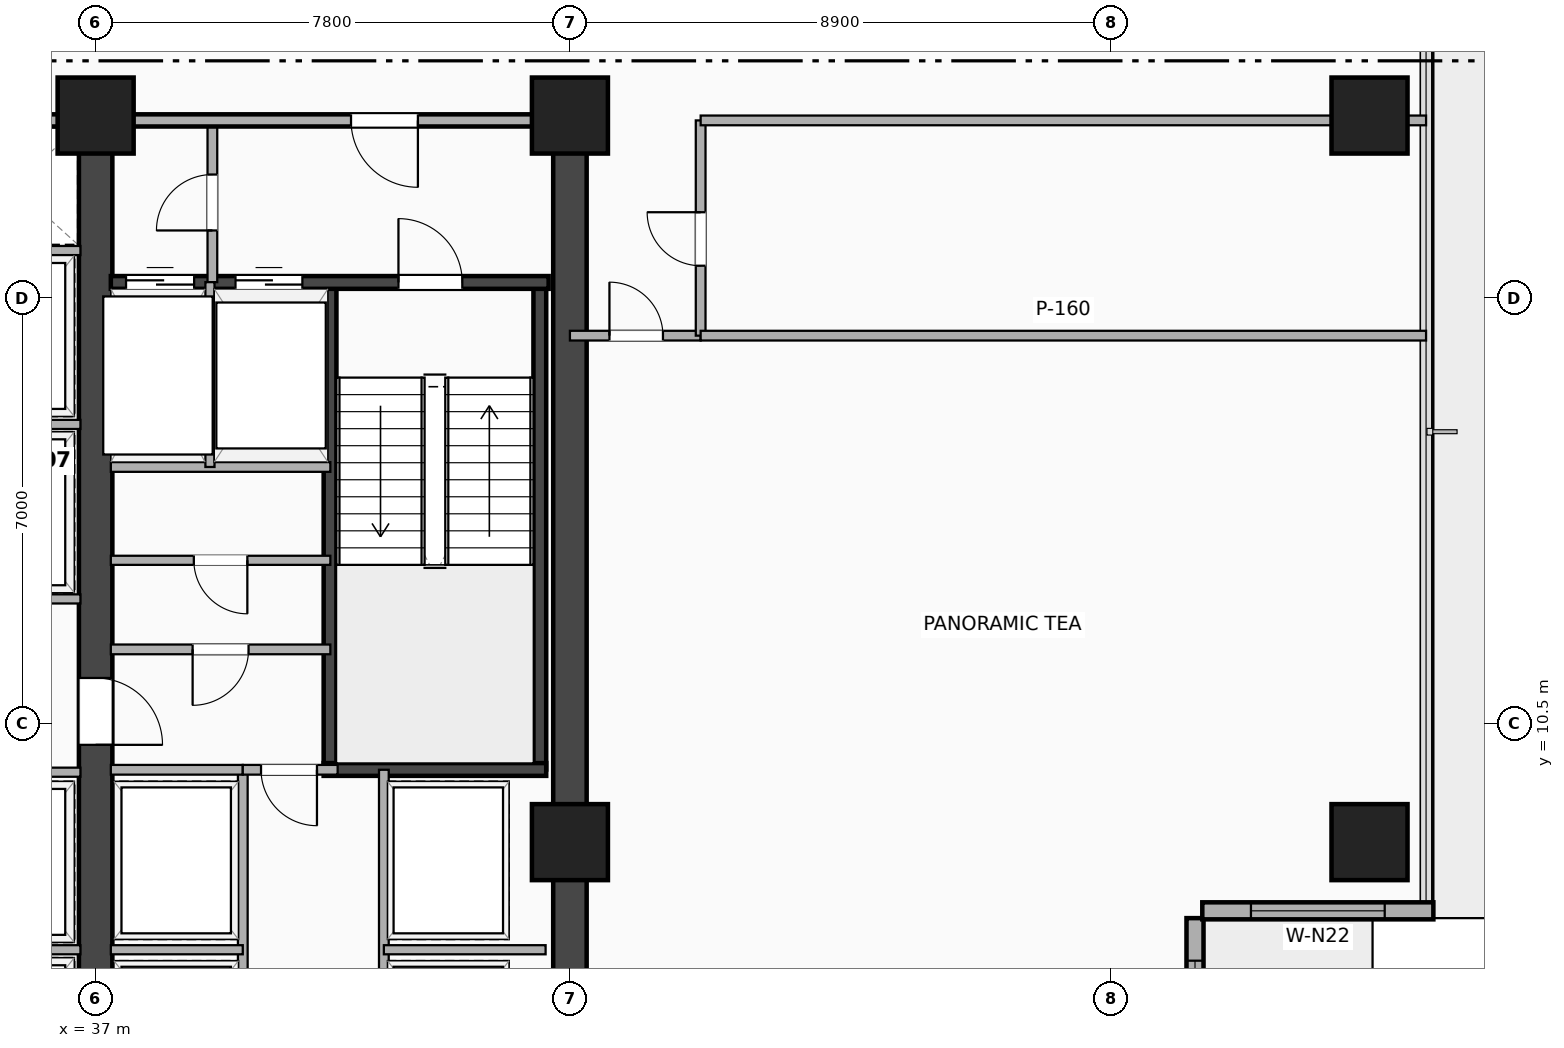
"""IFC4 building model, lengths in metres.
Left out: names, types, materials, properties, quantities, classifications, styles, units other than length and angle.
Written with IfcOpenShell. Run it as: python <this file> out.ifc"""

import sys

from ifc_helpers import new_model, si_unit, direction, frame, frame_2d, origin, origin_2d, place, context, subcontext, project, spatial, rectangle, extrude, element, fill, save


model = new_model("IFC4")
c1 = context("Model", 3, precision=1e-05, world=origin(), true_north=direction((0.0, 1.0)))
c2 = subcontext(c1, "Body", "Model", "MODEL_VIEW")
j1 = project(units=[si_unit("LENGTHUNIT", "METRE"), si_unit("PLANEANGLEUNIT", "RADIAN")], contexts=[c1])
p1 = place(None, origin())
s1 = spatial("IfcSite", under=j1, at=p1, CompositionType="ELEMENT")
p2 = place(p1, origin())
s2 = spatial("IfcBuilding", under=s1, at=p2, CompositionType="ELEMENT")
p3 = place(p2, frame((0.0, 0.0, 83.8)))
s3 = spatial("IfcBuildingStorey", under=s2, at=p3, CompositionType="ELEMENT", Elevation=83.8)
p4 = place(p3, frame((44.8, 3.5, 0.0), z_axis=(0.0, 0.0, 1.0), x_axis=(0.0, 1.0, 0.0)))
e1 = element("IfcWall", 1, at=p4, inside=s3, PredefinedType="SHEAR", context=c2, shape_type="SweptSolid", body=[
    extrude(rectangle(XDim=16.9, YDim=0.55, at=frame_2d((8.45, 0.0))), origin(), (0.0, 0.0, 1.0), 4.14),
])
p5 = place(p3, frame((37.0, 3.5, 0.0), z_axis=(0.0, 0.0, 1.0), x_axis=(0.0, 1.0, 0.0)))
e2 = element("IfcWall", 2, at=p5, inside=s3, PredefinedType="SHEAR", context=c2, shape_type="SweptSolid", body=[
    extrude(rectangle(XDim=16.9, YDim=0.55, at=frame_2d((8.45, 0.0))), origin(), (0.0, 0.0, 1.0), 4.14),
])
p6 = place(p5, frame((6.65, 0.0, 0.0)))
e3 = element("IfcOpeningElement", 3, at=p6, cuts=e2, PredefinedType="OPENING", context=c2, shape_type="SweptSolid", body=[
    extrude(rectangle(XDim=1.1, YDim=2.15, at=frame_2d((0.55, 1.075))), frame((0.0, 0.285, 0.0), z_axis=(0.0, -1.0, 0.0), x_axis=(1.0, 0.0, 0.0)), (0.0, 0.0, 1.0), 0.57),
])
for number, where, z_axis, x_axis in (
    (4, (40.855, 9.745, 0.0), (0.0, 0.0, 1.0), (0.0, 1.0, 0.0)),
    (5, (44.305, 9.745, 0.0), (0.0, 0.0, 1.0), (0.0, 1.0, 0.0)),
):
    element("IfcWall", number, at=place(p3, frame(where, z_axis=z_axis, x_axis=x_axis)), inside=s3, PredefinedType="SHEAR", context=c2, shape_type="SweptSolid", body=[
        extrude(rectangle(XDim=8.01, YDim=0.21, at=frame_2d((4.005, 0.0))), origin(), (0.0, 0.0, 1.0), 4.14),
    ])
p7 = place(p3, frame((40.75, 9.745, 0.0), z_axis=(0.0, 0.0, 1.0), x_axis=(1.0, 0.0, 0.0)))
e6 = element("IfcWall", 6, at=p7, inside=s3, PredefinedType="SHEAR", context=c2, shape_type="SweptSolid", body=[
    extrude(rectangle(XDim=3.66, YDim=0.21, at=frame_2d((1.83, 0.0))), origin(), (0.0, 0.0, 1.0), 4.14),
])
p8 = place(p3, frame((37.25, 17.755, 0.0), z_axis=(0.0, 0.0, 1.0), x_axis=(1.0, 0.0, 0.0)))
e7 = element("IfcWall", 7, at=p8, inside=s3, PredefinedType="SHEAR", context=c2, shape_type="SweptSolid", body=[
    extrude(rectangle(XDim=7.2, YDim=0.21, at=frame_2d((3.6, 0.0))), origin(), (0.0, 0.0, 1.0), 4.14),
])
p9 = place(p8, frame((0.25, 0.0, 0.0)))
e8 = element("IfcOpeningElement", 8, at=p9, cuts=e7, PredefinedType="OPENING", context=c2, shape_type="SweptSolid", body=[
    extrude(rectangle(XDim=1.12, YDim=2.2, at=frame_2d((0.56, 1.1))), frame((0.0, 0.115, 0.0), z_axis=(0.0, -1.0, 0.0), x_axis=(1.0, 0.0, 0.0)), (0.0, 0.0, 1.0), 0.23),
])
p10 = place(p8, frame((2.05, 0.0, 0.0)))
e9 = element("IfcOpeningElement", 9, at=p10, cuts=e7, PredefinedType="OPENING", context=c2, shape_type="SweptSolid", body=[
    extrude(rectangle(XDim=1.1, YDim=2.18, at=frame_2d((0.55, 1.09))), frame((0.0, 0.115, 0.0), z_axis=(0.0, -1.0, 0.0), x_axis=(1.0, 0.0, 0.0)), (0.0, 0.0, 1.0), 0.23),
])
p11 = place(p8, frame((5.78, 0.0, 0.0), z_axis=(0.0, 0.0, 1.0), x_axis=(-1.0, 0.0, 0.0)))
e10 = element("IfcOpeningElement", 10, at=p11, cuts=e7, PredefinedType="OPENING", context=c2, shape_type="SweptSolid", body=[
    extrude(rectangle(XDim=1.05, YDim=2.15, at=frame_2d((0.525, 1.075))), frame((0.0, 0.115, 0.0), z_axis=(0.0, -1.0, 0.0), x_axis=(1.0, 0.0, 0.0)), (0.0, 0.0, 1.0), 0.23),
])
for number, where, z_axis, x_axis in (
    (11, (44.8, 8.55, -0.26), (0.0, 0.0, 1.0), (1.0, 0.0, 0.0)),
    (12, (37.0, 20.5, -0.26), (0.0, 0.0, 1.0), (1.0, 0.0, 0.0)),
    (13, (44.8, 20.5, -0.26), (0.0, 0.0, 1.0), (1.0, 0.0, 0.0)),
    (14, (57.95, 8.55, -0.26), (0.0, 0.0, 1.0), (1.0, 0.0, 0.0)),
    (15, (57.95, 20.5, -0.26), (0.0, 0.0, 1.0), (1.0, 0.0, 0.0)),
):
    element("IfcColumn", number, at=place(p3, frame(where, z_axis=z_axis, x_axis=x_axis)), inside=s3, PredefinedType="COLUMN", context=c2, shape_type="SweptSolid", body=[
        extrude(rectangle(XDim=1.25, YDim=1.25, at=origin_2d()), origin(), (0.0, 0.0, 1.0), 4.4),
    ])
p12 = place(p3, frame((55.08, 3.5, 0.0), z_axis=(0.0, 0.0, 1.0), x_axis=(0.0, 1.0, 0.0)))
e16 = element("IfcWall", 16, at=p12, inside=s3, PredefinedType="SOLIDWALL", context=c2, shape_type="SweptSolid", body=[
    extrude(rectangle(XDim=3.8, YDim=0.28, at=frame_2d((1.9, 0.0))), origin(), (0.0, 0.0, 1.0), 4.14),
])
p13 = place(p12, frame((0.7, 0.0, 0.85)))
e17 = element("IfcOpeningElement", 17, at=p13, cuts=e16, PredefinedType="OPENING", context=c2, shape_type="SweptSolid", body=[
    extrude(rectangle(XDim=2.4, YDim=1.65, at=frame_2d((1.2, 0.825))), frame((0.0, 0.15, 0.0), z_axis=(0.0, -1.0, 0.0), x_axis=(1.0, 0.0, 0.0)), (0.0, 0.0, 1.0), 0.3),
])
p14 = place(p3, frame((55.2, 7.42, 0.0), z_axis=(0.0, 0.0, 1.0), x_axis=(1.0, 0.0, 0.0)))
e18 = element("IfcWall", 18, at=p14, inside=s3, PredefinedType="SOLIDWALL", context=c2, shape_type="SweptSolid", body=[
    extrude(rectangle(XDim=3.8, YDim=0.28, at=frame_2d((1.9, 0.0))), origin(), (0.0, 0.0, 1.0), 4.14),
])
p15 = place(p14, frame((0.8, 0.0, 0.85)))
e19 = element("IfcOpeningElement", 19, at=p15, cuts=e18, PredefinedType="OPENING", context=c2, shape_type="SweptSolid", body=[
    extrude(rectangle(XDim=2.2, YDim=1.65, at=frame_2d((1.1, 0.825))), frame((0.0, 0.15, 0.0), z_axis=(0.0, -1.0, 0.0), x_axis=(1.0, 0.0, 0.0)), (0.0, 0.0, 1.0), 0.3),
])
p16 = place(p3, frame((38.92, 17.76, 0.0), z_axis=(0.0, 0.0, 1.0), x_axis=(0.0, 1.0, 0.0)))
e20 = element("IfcWall", 20, at=p16, inside=s3, PredefinedType="PARTITIONING", context=c2, shape_type="SweptSolid", body=[
    extrude(rectangle(XDim=2.66, YDim=0.16, at=frame_2d((1.33, 0.0))), origin(), (0.0, 0.0, 1.0), 3.514),
])
p17 = place(p16, frame((1.77, 0.0, 0.0), z_axis=(0.0, 0.0, 1.0), x_axis=(-1.0, 0.0, 0.0)))
e21 = element("IfcOpeningElement", 21, at=p17, cuts=e20, PredefinedType="OPENING", context=c2, shape_type="SweptSolid", body=[
    extrude(rectangle(XDim=0.92, YDim=2.08, at=frame_2d((0.46, 1.04))), frame((0.0, 0.09, 0.0), z_axis=(0.0, -1.0, 0.0), x_axis=(1.0, 0.0, 0.0)), (0.0, 0.0, 1.0), 0.18),
])
p18 = place(p3, frame((37.25, 14.72, 0.0), z_axis=(0.0, 0.0, 1.0), x_axis=(1.0, 0.0, 0.0)))
e22 = element("IfcWall", 22, at=p18, inside=s3, PredefinedType="PARTITIONING", context=c2, shape_type="SweptSolid", body=[
    extrude(rectangle(XDim=3.61, YDim=0.16, at=frame_2d((1.805, 0.0))), origin(), (0.0, 0.0, 1.0), 4.14),
])
p19 = place(p3, frame((38.88, 14.72, 0.0), z_axis=(0.0, 0.0, 1.0), x_axis=(0.0, 1.0, 0.0)))
e23 = element("IfcWall", 23, at=p19, inside=s3, PredefinedType="PARTITIONING", context=c2, shape_type="SweptSolid", body=[
    extrude(rectangle(XDim=3.04, YDim=0.15, at=frame_2d((1.52, 0.0))), origin(), (0.0, 0.0, 1.0), 4.14),
])
p20 = place(p3, frame((29.2, 20.42, 0.0), z_axis=(0.0, 0.0, 1.0), x_axis=(1.0, 0.0, 0.0)))
e24 = element("IfcWall", 24, at=p20, inside=s3, PredefinedType="PARTITIONING", context=c2, shape_type="SweptSolid", body=[
    extrude(rectangle(XDim=7.8, YDim=0.2, at=frame_2d((3.9, 0.0))), origin(), (0.0, 0.0, 1.0), 3.213),
])
p21 = place(p20, frame((3.55, 0.0, 0.0)))
e25 = element("IfcOpeningElement", 25, at=p21, cuts=e24, PredefinedType="OPENING", context=c2, shape_type="SweptSolid", body=[
    extrude(rectangle(XDim=1.1, YDim=2.15, at=frame_2d((0.55, 1.075))), frame((0.0, 0.11, 0.0), z_axis=(0.0, -1.0, 0.0), x_axis=(1.0, 0.0, 0.0)), (0.0, 0.0, 1.0), 0.22),
])
p22 = place(p3, frame((37.0, 20.42, 0.0), z_axis=(0.0, 0.0, 1.0), x_axis=(1.0, 0.0, 0.0)))
e26 = element("IfcWall", 26, at=p22, inside=s3, PredefinedType="PARTITIONING", context=c2, shape_type="SweptSolid", body=[
    extrude(rectangle(XDim=7.45, YDim=0.2, at=frame_2d((3.725, 0.0))), origin(), (0.0, 0.0, 1.0), 3.213),
])
p23 = place(p22, frame((4.2, 0.0, 0.0)))
e27 = element("IfcOpeningElement", 27, at=p23, cuts=e26, PredefinedType="OPENING", context=c2, shape_type="SweptSolid", body=[
    extrude(rectangle(XDim=1.1, YDim=2.15, at=frame_2d((0.55, 1.075))), frame((0.0, 0.11, 0.0), z_axis=(0.0, -1.0, 0.0), x_axis=(1.0, 0.0, 0.0)), (0.0, 0.0, 1.0), 0.22),
])
p24 = place(p3, frame((37.25, 11.72, 0.0), z_axis=(0.0, 0.0, 1.0), x_axis=(1.0, 0.0, 0.0)))
e28 = element("IfcWall", 28, at=p24, inside=s3, PredefinedType="PARTITIONING", context=c2, shape_type="SweptSolid", body=[
    extrude(rectangle(XDim=3.61, YDim=0.16, at=frame_2d((1.805, 0.0))), origin(), (0.0, 0.0, 1.0), 4.14),
])
p25 = place(p24, frame((1.345, 0.0, 0.0)))
e29 = element("IfcOpeningElement", 29, at=p25, cuts=e28, PredefinedType="OPENING", context=c2, shape_type="SweptSolid", body=[
    extrude(rectangle(XDim=0.92, YDim=2.08, at=frame_2d((0.46, 1.04))), frame((0.0, 0.09, 0.0), z_axis=(0.0, -1.0, 0.0), x_axis=(1.0, 0.0, 0.0)), (0.0, 0.0, 1.0), 0.18),
])
p26 = place(p3, frame((37.25, 13.185, 0.0), z_axis=(0.0, 0.0, 1.0), x_axis=(1.0, 0.0, 0.0)))
e30 = element("IfcWall", 30, at=p26, inside=s3, PredefinedType="PARTITIONING", context=c2, shape_type="SweptSolid", body=[
    extrude(rectangle(XDim=3.61, YDim=0.15, at=frame_2d((1.805, 0.0))), origin(), (0.0, 0.0, 1.0), 4.14),
])
p27 = place(p26, frame((1.365, 0.0, 0.0)))
e31 = element("IfcOpeningElement", 31, at=p27, cuts=e30, PredefinedType="OPENING", context=c2, shape_type="SweptSolid", body=[
    extrude(rectangle(XDim=0.88, YDim=2.08, at=frame_2d((0.44, 1.04))), frame((0.0, 0.085, 0.0), z_axis=(0.0, -1.0, 0.0), x_axis=(1.0, 0.0, 0.0)), (0.0, 0.0, 1.0), 0.17),
])
for number, where, z_axis, x_axis in (
    (32, (39.42, 3.9, 0.0), (0.0, 0.0, 1.0), (0.0, 1.0, 0.0)),
    (33, (41.74, 3.9, 0.0), (0.0, 0.0, 1.0), (0.0, 1.0, 0.0)),
):
    element("IfcWall", number, at=place(p3, frame(where, z_axis=z_axis, x_axis=x_axis)), inside=s3, PredefinedType="PARTITIONING", context=c2, shape_type="SweptSolid", body=[
        extrude(rectangle(XDim=5.84, YDim=0.16, at=frame_2d((2.92, 0.0))), origin(), (0.0, 0.0, 1.0), 4.14),
    ])
p28 = place(p3, frame((37.25, 6.78, 0.0), z_axis=(0.0, 0.0, 1.0), x_axis=(1.0, 0.0, 0.0)))
e34 = element("IfcWall", 34, at=p28, inside=s3, PredefinedType="PARTITIONING", context=c2, shape_type="SweptSolid", body=[
    extrude(rectangle(XDim=2.17, YDim=0.15, at=frame_2d((1.085, 0.0))), origin(), (0.0, 0.0, 1.0), 4.14),
])
p29 = place(p3, frame((41.74, 6.78, 0.0), z_axis=(0.0, 0.0, 1.0), x_axis=(1.0, 0.0, 0.0)))
e35 = element("IfcWall", 35, at=p29, inside=s3, PredefinedType="PARTITIONING", context=c2, shape_type="SweptSolid", body=[
    extrude(rectangle(XDim=2.66, YDim=0.15, at=frame_2d((1.33, 0.0))), origin(), (0.0, 0.0, 1.0), 3.213),
])
p30 = place(p3, frame((37.25, 9.74, 0.0), z_axis=(0.0, 0.0, 1.0), x_axis=(1.0, 0.0, 0.0)))
e36 = element("IfcWall", 36, at=p30, inside=s3, PredefinedType="PARTITIONING", context=c2, shape_type="SweptSolid", body=[
    extrude(rectangle(XDim=2.17, YDim=0.16, at=frame_2d((1.085, 0.0))), origin(), (0.0, 0.0, 1.0), 4.14),
])
p31 = place(p3, frame((39.42, 9.74, 0.0), z_axis=(0.0, 0.0, 1.0), x_axis=(1.0, 0.0, 0.0)))
e37 = element("IfcWall", 37, at=p31, inside=s3, PredefinedType="PARTITIONING", context=c2, shape_type="SweptSolid", body=[
    extrude(rectangle(XDim=1.56, YDim=0.16, at=frame_2d((0.78, 0.0))), origin(), (0.0, 0.0, 1.0), 4.14),
])
p32 = place(p31, frame((0.3, 0.0, 0.0)))
e38 = element("IfcOpeningElement", 38, at=p32, cuts=e37, PredefinedType="OPENING", context=c2, shape_type="SweptSolid", body=[
    extrude(rectangle(XDim=0.92, YDim=2.08, at=frame_2d((0.46, 1.04))), frame((0.0, 0.09, 0.0), z_axis=(0.0, -1.0, 0.0), x_axis=(1.0, 0.0, 0.0)), (0.0, 0.0, 1.0), 0.18),
])
for number, where, z_axis, x_axis in (
    (39, (34.48, 6.78, 0.0), (0.0, 0.0, 1.0), (1.0, 0.0, 0.0)),
    (40, (34.48, 9.7, 0.0), (0.0, 0.0, 1.0), (1.0, 0.0, 0.0)),
    (41, (34.48, 12.55, 0.0), (0.0, 0.0, 1.0), (1.0, 0.0, 0.0)),
    (42, (34.48, 15.42, 0.0), (0.0, 0.0, 1.0), (1.0, 0.0, 0.0)),
    (43, (34.48, 18.28, 0.0), (0.0, 0.0, 1.0), (1.0, 0.0, 0.0)),
):
    element("IfcWall", number, at=place(p3, frame(where, z_axis=z_axis, x_axis=x_axis)), inside=s3, PredefinedType="PARTITIONING", context=c2, shape_type="SweptSolid", body=[
        extrude(rectangle(XDim=2.27, YDim=0.15, at=frame_2d((1.135, 0.0))), origin(), (0.0, 0.0, 1.0), 4.14),
    ])
p33 = place(p3, frame((44.8, 16.88, 0.0), z_axis=(0.0, 0.0, 1.0), x_axis=(1.0, 0.0, 0.0)))
e44 = element("IfcWall", 44, at=p33, inside=s3, PredefinedType="PARTITIONING", context=c2, shape_type="SweptSolid", body=[
    extrude(rectangle(XDim=2.15, YDim=0.16, at=frame_2d((1.075, 0.0))), origin(), (0.0, 0.0, 1.0), 3.213),
])
p34 = place(p33, frame((1.53, 0.0, 0.0), z_axis=(0.0, 0.0, 1.0), x_axis=(-1.0, 0.0, 0.0)))
e45 = element("IfcOpeningElement", 45, at=p34, cuts=e44, PredefinedType="OPENING", context=c2, shape_type="SweptSolid", body=[
    extrude(rectangle(XDim=0.88, YDim=2.08, at=frame_2d((0.44, 1.04))), frame((0.0, 0.09, 0.0), z_axis=(0.0, -1.0, 0.0), x_axis=(1.0, 0.0, 0.0)), (0.0, 0.0, 1.0), 0.18),
])
p35 = place(p3, frame((46.95, 16.88, 0.0), z_axis=(0.0, 0.0, 1.0), x_axis=(0.0, 1.0, 0.0)))
e46 = element("IfcWall", 46, at=p35, inside=s3, PredefinedType="PARTITIONING", context=c2, shape_type="SweptSolid", body=[
    extrude(rectangle(XDim=3.54, YDim=0.16, at=frame_2d((1.77, 0.0))), origin(), (0.0, 0.0, 1.0), 3.213),
])
p36 = place(p35, frame((2.03, 0.0, 0.0), z_axis=(0.0, 0.0, 1.0), x_axis=(-1.0, 0.0, 0.0)))
e47 = element("IfcOpeningElement", 47, at=p36, cuts=e46, PredefinedType="OPENING", context=c2, shape_type="SweptSolid", body=[
    extrude(rectangle(XDim=0.88, YDim=2.08, at=frame_2d((0.44, 1.04))), frame((0.0, 0.09, 0.0), z_axis=(0.0, -1.0, 0.0), x_axis=(1.0, 0.0, 0.0)), (0.0, 0.0, 1.0), 0.18),
])
p37 = place(p3, frame((46.95, 16.88, 0.0), z_axis=(0.0, 0.0, 1.0), x_axis=(1.0, 0.0, 0.0)))
e48 = element("IfcWall", 48, at=p37, inside=s3, PredefinedType="PARTITIONING", context=c2, shape_type="SweptSolid", body=[
    extrude(rectangle(XDim=11.93, YDim=0.16, at=frame_2d((5.965, 0.0))), origin(), (0.0, 0.0, 1.0), 3.503),
])
p38 = place(p3, frame((46.95, 20.42, 0.0), z_axis=(0.0, 0.0, 1.0), x_axis=(1.0, 0.0, 0.0)))
e49 = element("IfcWall", 49, at=p38, inside=s3, PredefinedType="PARTITIONING", context=c2, shape_type="SweptSolid", body=[
    extrude(rectangle(XDim=11.93, YDim=0.16, at=frame_2d((5.965, 0.0))), origin(), (0.0, 0.0, 1.0), 3.213),
])
p39 = place(p13, origin())
e50 = element("IfcWindow", 50, at=p39, inside=s3, PartitioningType="SINGLE_PANEL", PredefinedType="WINDOW", context=c2, shape_type="SweptSolid", body=[
    extrude(rectangle(XDim=2.4, YDim=1.65, at=frame_2d((1.2, 0.825))), frame((0.0, 0.03, 0.0), z_axis=(0.0, -1.0, 0.0), x_axis=(1.0, 0.0, 0.0)), (0.0, 0.0, 1.0), 0.06),
])
fill(e17, e50)
p40 = place(p15, origin())
e51 = element("IfcWindow", 51, at=p40, inside=s3, PartitioningType="SINGLE_PANEL", PredefinedType="WINDOW", context=c2, shape_type="SweptSolid", body=[
    extrude(rectangle(XDim=2.2, YDim=1.65, at=frame_2d((1.1, 0.825))), frame((0.0, 0.03, 0.0), z_axis=(0.0, -1.0, 0.0), x_axis=(1.0, 0.0, 0.0)), (0.0, 0.0, 1.0), 0.06),
])
fill(e19, e51)
p41 = place(p9, origin())
e52 = element("IfcDoor", 52, at=p41, inside=s3, OperationType="DOUBLE_DOOR_SLIDING", PredefinedType="DOOR", context=c2, shape_type="SweptSolid", body=[
    extrude(rectangle(XDim=1.12, YDim=2.2, at=frame_2d((0.56, 1.1))), frame((0.0, 0.025, 0.0), z_axis=(0.0, -1.0, 0.0), x_axis=(1.0, 0.0, 0.0)), (0.0, 0.0, 1.0), 0.05),
])
fill(e8, e52)
p42 = place(p10, origin())
e53 = element("IfcDoor", 53, at=p42, inside=s3, OperationType="DOUBLE_DOOR_SLIDING", PredefinedType="DOOR", context=c2, shape_type="SweptSolid", body=[
    extrude(rectangle(XDim=1.1, YDim=2.18, at=frame_2d((0.55, 1.09))), frame((0.0, 0.025, 0.0), z_axis=(0.0, -1.0, 0.0), x_axis=(1.0, 0.0, 0.0)), (0.0, 0.0, 1.0), 0.05),
])
fill(e9, e53)
p43 = place(p11, origin())
e54 = element("IfcDoor", 54, at=p43, inside=s3, OperationType="SINGLE_SWING_LEFT", PredefinedType="DOOR", context=c2, shape_type="SweptSolid", body=[
    extrude(rectangle(XDim=1.05, YDim=2.15, at=frame_2d((0.525, 1.075))), frame((0.0, 0.025, 0.0), z_axis=(0.0, -1.0, 0.0), x_axis=(1.0, 0.0, 0.0)), (0.0, 0.0, 1.0), 0.05),
])
fill(e10, e54)
p44 = place(p6, origin())
e55 = element("IfcDoor", 55, at=p44, inside=s3, OperationType="SINGLE_SWING_LEFT", PredefinedType="DOOR", context=c2, shape_type="SweptSolid", body=[
    extrude(rectangle(XDim=1.1, YDim=2.15, at=frame_2d((0.55, 1.075))), frame((0.0, 0.025, 0.0), z_axis=(0.0, -1.0, 0.0), x_axis=(1.0, 0.0, 0.0)), (0.0, 0.0, 1.0), 0.05),
])
fill(e3, e55)
p45 = place(p17, origin())
e56 = element("IfcDoor", 56, at=p45, inside=s3, OperationType="SINGLE_SWING_LEFT", PredefinedType="DOOR", context=c2, shape_type="SweptSolid", body=[
    extrude(rectangle(XDim=0.92, YDim=2.08, at=frame_2d((0.46, 1.04))), frame((0.0, 0.025, 0.0), z_axis=(0.0, -1.0, 0.0), x_axis=(1.0, 0.0, 0.0)), (0.0, 0.0, 1.0), 0.05),
])
fill(e21, e56)
p46 = place(p23, origin())
e57 = element("IfcDoor", 57, at=p46, inside=s3, OperationType="SINGLE_SWING_RIGHT", PredefinedType="DOOR", context=c2, shape_type="SweptSolid", body=[
    extrude(rectangle(XDim=1.1, YDim=2.15, at=frame_2d((0.55, 1.075))), frame((0.0, 0.025, 0.0), z_axis=(0.0, -1.0, 0.0), x_axis=(1.0, 0.0, 0.0)), (0.0, 0.0, 1.0), 0.05),
])
fill(e27, e57)
p47 = place(p25, origin())
e58 = element("IfcDoor", 58, at=p47, inside=s3, OperationType="SINGLE_SWING_LEFT", PredefinedType="DOOR", context=c2, shape_type="SweptSolid", body=[
    extrude(rectangle(XDim=0.92, YDim=2.08, at=frame_2d((0.46, 1.04))), frame((0.0, 0.025, 0.0), z_axis=(0.0, -1.0, 0.0), x_axis=(1.0, 0.0, 0.0)), (0.0, 0.0, 1.0), 0.05),
])
fill(e29, e58)
p48 = place(p27, origin())
e59 = element("IfcDoor", 59, at=p48, inside=s3, OperationType="SINGLE_SWING_RIGHT", PredefinedType="DOOR", context=c2, shape_type="SweptSolid", body=[
    extrude(rectangle(XDim=0.88, YDim=2.08, at=frame_2d((0.44, 1.04))), frame((0.0, 0.025, 0.0), z_axis=(0.0, -1.0, 0.0), x_axis=(1.0, 0.0, 0.0)), (0.0, 0.0, 1.0), 0.05),
])
fill(e31, e59)
p49 = place(p32, origin())
e60 = element("IfcDoor", 60, at=p49, inside=s3, OperationType="SINGLE_SWING_RIGHT", PredefinedType="DOOR", context=c2, shape_type="SweptSolid", body=[
    extrude(rectangle(XDim=0.92, YDim=2.08, at=frame_2d((0.46, 1.04))), frame((0.0, 0.025, 0.0), z_axis=(0.0, -1.0, 0.0), x_axis=(1.0, 0.0, 0.0)), (0.0, 0.0, 1.0), 0.05),
])
fill(e38, e60)
p50 = place(p34, origin())
e61 = element("IfcDoor", 61, at=p50, inside=s3, OperationType="SINGLE_SWING_LEFT", PredefinedType="DOOR", context=c2, shape_type="SweptSolid", body=[
    extrude(rectangle(XDim=0.88, YDim=2.08, at=frame_2d((0.44, 1.04))), frame((0.0, 0.025, 0.0), z_axis=(0.0, -1.0, 0.0), x_axis=(1.0, 0.0, 0.0)), (0.0, 0.0, 1.0), 0.05),
])
fill(e45, e61)
p51 = place(p36, origin())
e62 = element("IfcDoor", 62, at=p51, inside=s3, OperationType="SINGLE_SWING_RIGHT", PredefinedType="DOOR", context=c2, shape_type="SweptSolid", body=[
    extrude(rectangle(XDim=0.88, YDim=2.08, at=frame_2d((0.44, 1.04))), frame((0.0, 0.025, 0.0), z_axis=(0.0, -1.0, 0.0), x_axis=(1.0, 0.0, 0.0)), (0.0, 0.0, 1.0), 0.05),
])
fill(e47, e62)
save(model, sys.argv[1])
